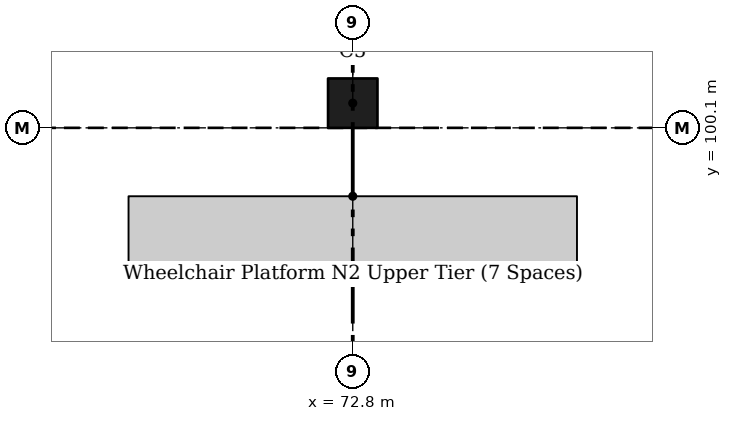
"""IFC4 building model, lengths in metres.
Left out: names, types, materials, properties, quantities, classifications, styles, units other than length and angle.
Written with IfcOpenShell. Run it as: python <this file> out.ifc"""

import sys

from ifc_helpers import new_model, si_unit, direction, frame, origin, origin_2d, place, context, subcontext, project, spatial, rectangle, extrude, element, save


model = new_model("IFC4")
c1 = context("Model", 3, precision=1e-05, world=origin(), true_north=direction((0.0, 1.0)))
c2 = subcontext(c1, "Body", "Model", "MODEL_VIEW")
j1 = project(units=[si_unit("LENGTHUNIT", "METRE"), si_unit("PLANEANGLEUNIT", "RADIAN")], contexts=[c1])
p1 = place(None, origin())
s1 = spatial("IfcSite", under=j1, at=p1, CompositionType="ELEMENT")
p2 = place(p1, origin())
s2 = spatial("IfcBuilding", under=s1, at=p2, CompositionType="ELEMENT")
p3 = place(p2, frame((0.0, 0.0, 24.57)))
s3 = spatial("IfcBuildingStorey", under=s2, at=p3, CompositionType="ELEMENT", Elevation=24.57)
p4 = place(p3, frame((72.8, 100.425, 0.0), z_axis=(0.0, 0.0, 1.0), x_axis=(1.0, 0.0, 0.0)))
e1 = element("IfcColumn", 1, at=p4, inside=s3, PredefinedType="COLUMN", context=c2, shape_type="SweptSolid", body=[
    extrude(rectangle(XDim=0.65, YDim=0.65, at=origin_2d()), origin(), (0.0, 0.0, 1.0), 4.55),
])
save(model, sys.argv[1])
